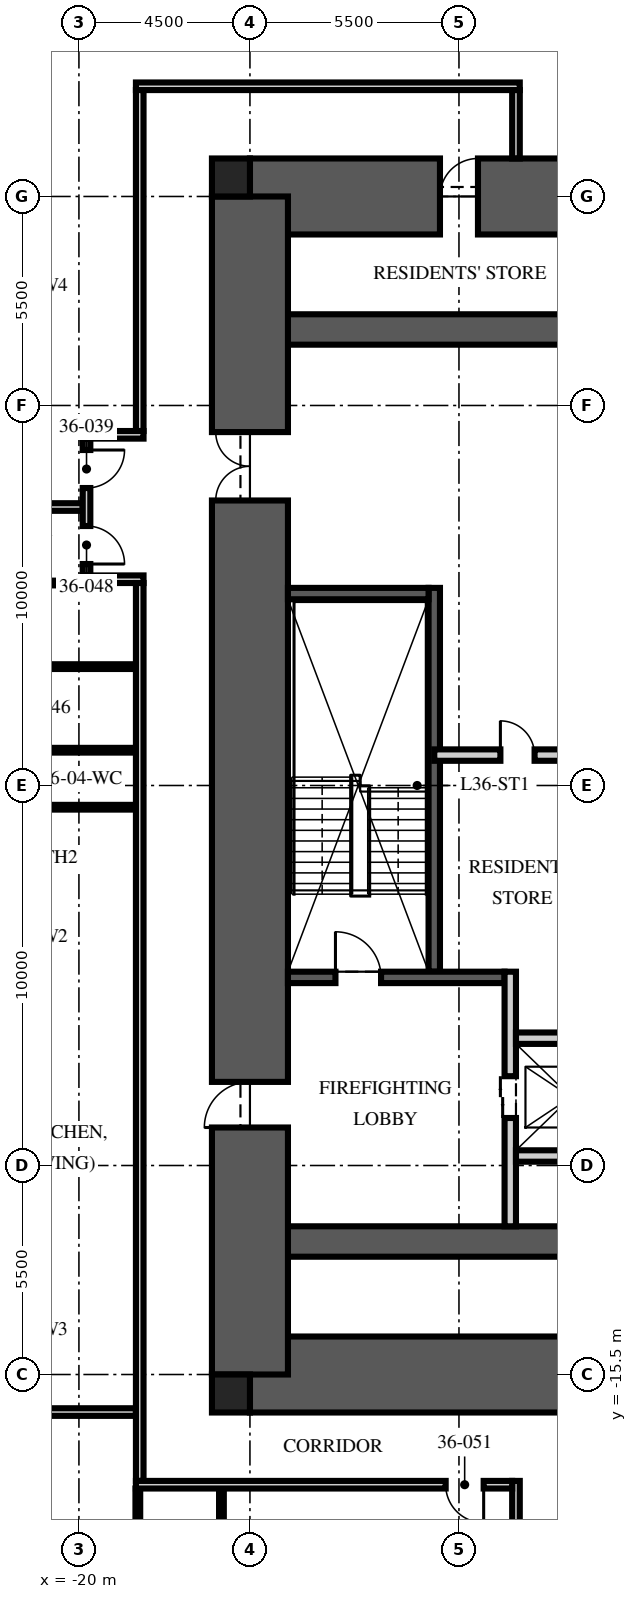
"""IFC4 building model, lengths in metres.
Left out: names, types, materials, properties, quantities, classifications, styles, units other than length and angle.
Written with IfcOpenShell. Run it as: python <this file> out.ifc"""

import sys

from ifc_helpers import new_model, si_unit, direction, frame, frame_2d, origin, origin_2d, place, context, subcontext, project, spatial, rectangle, extrude, element, fill, save


model = new_model("IFC4")
c1 = context("Model", 3, precision=1e-05, world=origin(), true_north=direction((0.0, 1.0)))
c2 = subcontext(c1, "Body", "Model", "MODEL_VIEW")
j1 = project(units=[si_unit("LENGTHUNIT", "METRE"), si_unit("PLANEANGLEUNIT", "RADIAN")], contexts=[c1])
p1 = place(None, origin())
s1 = spatial("IfcSite", under=j1, at=p1, CompositionType="ELEMENT")
p2 = place(p1, origin())
s2 = spatial("IfcBuilding", under=s1, at=p2, CompositionType="ELEMENT")
p3 = place(p2, frame((0.0, 0.0, 144.75)))
s3 = spatial("IfcBuildingStorey", under=s2, at=p3, CompositionType="ELEMENT", Elevation=144.75)
p4 = place(p3, frame((-15.5, 15.5, -0.25), z_axis=(0.0, 0.0, 1.0), x_axis=(1.0, 0.0, 0.0)))
e1 = element("IfcWall", 1, at=p4, inside=s3, PredefinedType="SHEAR", context=c2, shape_type="SweptSolid", body=[
    extrude(rectangle(XDim=31.0, YDim=2.0, at=frame_2d((15.5, 0.0))), origin(), (0.0, 0.0, 1.0), 3.75),
])
p5 = place(p4, frame((5.0, 0.0, 0.25)))
e2 = element("IfcOpeningElement", 2, at=p5, cuts=e1, PredefinedType="OPENING", context=c2, shape_type="SweptSolid", body=[
    extrude(rectangle(XDim=1.0, YDim=2.1, at=frame_2d((0.5, 1.05))), frame((0.0, 1.01, 0.0), z_axis=(0.0, -1.0, 0.0), x_axis=(1.0, 0.0, 0.0)), (0.0, 0.0, 1.0), 2.02),
])
p6 = place(p3, frame((-15.5, -15.5, -0.25), z_axis=(0.0, 0.0, 1.0), x_axis=(1.0, 0.0, 0.0)))
e3 = element("IfcWall", 3, at=p6, inside=s3, PredefinedType="SHEAR", context=c2, shape_type="SweptSolid", body=[
    extrude(rectangle(XDim=31.0, YDim=2.0, at=frame_2d((15.5, 0.0))), origin(), (0.0, 0.0, 1.0), 3.75),
])
p7 = place(p6, frame((10.4, 0.0, 0.25)))
e4 = element("IfcOpeningElement", 4, at=p7, cuts=e3, PredefinedType="OPENING", context=c2, shape_type="SweptSolid", body=[
    extrude(rectangle(XDim=1.1, YDim=2.1, at=frame_2d((0.55, 1.05))), frame((0.0, 1.01, 0.0), z_axis=(0.0, -1.0, 0.0), x_axis=(1.0, 0.0, 0.0)), (0.0, 0.0, 1.0), 2.02),
])
p8 = place(p6, frame((13.5, 0.0, 0.25)))
e5 = element("IfcOpeningElement", 5, at=p8, cuts=e3, PredefinedType="OPENING", context=c2, shape_type="SweptSolid", body=[
    extrude(rectangle(XDim=1.1, YDim=2.1, at=frame_2d((0.55, 1.05))), frame((0.0, 1.01, 0.0), z_axis=(0.0, -1.0, 0.0), x_axis=(1.0, 0.0, 0.0)), (0.0, 0.0, 1.0), 2.02),
])
p9 = place(p6, frame((16.6, 0.0, 0.25)))
e6 = element("IfcOpeningElement", 6, at=p9, cuts=e3, PredefinedType="OPENING", context=c2, shape_type="SweptSolid", body=[
    extrude(rectangle(XDim=1.1, YDim=2.1, at=frame_2d((0.55, 1.05))), frame((0.0, 1.01, 0.0), z_axis=(0.0, -1.0, 0.0), x_axis=(1.0, 0.0, 0.0)), (0.0, 0.0, 1.0), 2.02),
])
for number, where, z_axis, x_axis in (
    (7, (-15.5, 12.0, -0.25), (0.0, 0.0, 1.0), (1.0, 0.0, 0.0)),
    (8, (-15.5, -12.0, -0.25), (0.0, 0.0, 1.0), (1.0, 0.0, 0.0)),
):
    element("IfcWall", number, at=place(p3, frame(where, z_axis=z_axis, x_axis=x_axis)), inside=s3, PredefinedType="SHEAR", context=c2, shape_type="SweptSolid", body=[
        extrude(rectangle(XDim=31.0, YDim=0.8, at=frame_2d((15.5, 0.0))), origin(), (0.0, 0.0, 1.0), 3.75),
    ])
p10 = place(p3, frame((-15.5, -15.5, -0.25), z_axis=(0.0, 0.0, 1.0), x_axis=(0.0, 1.0, 0.0)))
e9 = element("IfcWall", 9, at=p10, inside=s3, PredefinedType="SHEAR", context=c2, shape_type="SweptSolid", body=[
    extrude(rectangle(XDim=31.0, YDim=2.0, at=frame_2d((15.5, 0.0))), origin(), (0.0, 0.0, 1.0), 3.75),
])
p11 = place(p10, frame((6.5, 0.0, 0.25)))
e10 = element("IfcOpeningElement", 10, at=p11, cuts=e9, PredefinedType="OPENING", context=c2, shape_type="SweptSolid", body=[
    extrude(rectangle(XDim=1.2, YDim=2.1, at=frame_2d((0.6, 1.05))), frame((0.0, 1.01, 0.0), z_axis=(0.0, -1.0, 0.0), x_axis=(1.0, 0.0, 0.0)), (0.0, 0.0, 1.0), 2.02),
])
p12 = place(p10, frame((23.0, 0.0, 0.25)))
e11 = element("IfcOpeningElement", 11, at=p12, cuts=e9, PredefinedType="OPENING", context=c2, shape_type="SweptSolid", body=[
    extrude(rectangle(XDim=1.8, YDim=2.1, at=frame_2d((0.9, 1.05))), frame((0.0, 1.01, 0.0), z_axis=(0.0, -1.0, 0.0), x_axis=(1.0, 0.0, 0.0)), (0.0, 0.0, 1.0), 2.02),
])
for number, where, z_axis, x_axis in (
    (12, (-16.0, 16.0, -0.25), (0.0, 0.0, 1.0), (1.0, 0.0, 0.0)),
    (13, (-16.0, -16.0, -0.25), (0.0, 0.0, 1.0), (1.0, 0.0, 0.0)),
):
    element("IfcColumn", number, at=place(p3, frame(where, z_axis=z_axis, x_axis=x_axis)), inside=s3, PredefinedType="COLUMN", context=c2, shape_type="SweptSolid", body=[
        extrude(rectangle(XDim=1.0, YDim=1.0, at=origin_2d()), origin(), (0.0, 0.0, 1.0), 3.75),
    ])
p13 = place(p3, frame((-10.65, -4.9, 0.0), z_axis=(0.0, 0.0, 1.0), x_axis=(0.0, 1.0, 0.0)))
e14 = element("IfcWall", 14, at=p13, inside=s3, PredefinedType="SOLIDWALL", context=c2, shape_type="SweptSolid", body=[
    extrude(rectangle(XDim=10.1, YDim=0.3, at=frame_2d((5.05, 0.0))), origin(), (0.0, 0.0, 1.0), 3.5),
])
p14 = place(p3, frame((-14.5, -5.05, 0.0), z_axis=(0.0, 0.0, 1.0), x_axis=(1.0, 0.0, 0.0)))
e15 = element("IfcWall", 15, at=p14, inside=s3, PredefinedType="SOLIDWALL", context=c2, shape_type="SweptSolid", body=[
    extrude(rectangle(XDim=5.7, YDim=0.3, at=frame_2d((2.85, 0.0))), origin(), (0.0, 0.0, 1.0), 3.5),
])
p15 = place(p14, frame((1.25, 0.0, 0.0)))
e16 = element("IfcOpeningElement", 16, at=p15, cuts=e15, PredefinedType="OPENING", context=c2, shape_type="SweptSolid", body=[
    extrude(rectangle(XDim=1.2, YDim=2.1, at=frame_2d((0.6, 1.05))), frame((0.0, 0.16, 0.0), z_axis=(0.0, -1.0, 0.0), x_axis=(1.0, 0.0, 0.0)), (0.0, 0.0, 1.0), 0.32),
])
p16 = place(p3, frame((-14.5, 5.05, 0.0), z_axis=(0.0, 0.0, 1.0), x_axis=(1.0, 0.0, 0.0)))
e17 = element("IfcWall", 17, at=p16, inside=s3, PredefinedType="SOLIDWALL", context=c2, shape_type="SweptSolid", body=[
    extrude(rectangle(XDim=3.7, YDim=0.3, at=frame_2d((1.85, 0.0))), origin(), (0.0, 0.0, 1.0), 3.5),
])
p17 = place(p3, frame((-8.65, -11.6, 0.0), z_axis=(0.0, 0.0, 1.0), x_axis=(0.0, 1.0, 0.0)))
e18 = element("IfcWall", 18, at=p17, inside=s3, PredefinedType="PARTITIONING", context=c2, shape_type="SweptSolid", body=[
    extrude(rectangle(XDim=6.7, YDim=0.3, at=frame_2d((3.35, 0.0))), origin(), (0.0, 0.0, 1.0), 3.5),
])
p18 = place(p17, frame((2.85, 0.0, 0.0)))
e19 = element("IfcOpeningElement", 19, at=p18, cuts=e18, PredefinedType="OPENING", context=c2, shape_type="SweptSolid", body=[
    extrude(rectangle(XDim=1.1, YDim=2.1, at=frame_2d((0.55, 1.05))), frame((0.0, 0.16, 0.0), z_axis=(0.0, -1.0, 0.0), x_axis=(1.0, 0.0, 0.0)), (0.0, 0.0, 1.0), 0.32),
])
p19 = place(p3, frame((-8.5, -6.65, 0.0), z_axis=(0.0, 0.0, 1.0), x_axis=(1.0, 0.0, 0.0)))
e20 = element("IfcWall", 20, at=p19, inside=s3, PredefinedType="PARTITIONING", context=c2, shape_type="SweptSolid", body=[
    extrude(rectangle(XDim=17.0, YDim=0.3, at=frame_2d((8.5, 0.0))), origin(), (0.0, 0.0, 1.0), 3.5),
])
p20 = place(p19, frame((7.8, 0.0, 0.0)))
e21 = element("IfcOpeningElement", 21, at=p20, cuts=e20, PredefinedType="OPENING", context=c2, shape_type="SweptSolid", body=[
    extrude(rectangle(XDim=1.3, YDim=2.4, at=frame_2d((0.65, 1.2))), frame((0.0, 0.16, 0.0), z_axis=(0.0, -1.0, 0.0), x_axis=(1.0, 0.0, 0.0)), (0.0, 0.0, 1.0), 0.32),
])
p21 = place(p19, frame((5.65, 0.0, 0.0)))
e22 = element("IfcOpeningElement", 22, at=p21, cuts=e20, PredefinedType="OPENING", context=c2, shape_type="SweptSolid", body=[
    extrude(rectangle(XDim=0.9, YDim=2.1, at=frame_2d((0.45, 1.05))), frame((0.0, 0.16, 0.0), z_axis=(0.0, -1.0, 0.0), x_axis=(1.0, 0.0, 0.0)), (0.0, 0.0, 1.0), 0.32),
])
p22 = place(p19, frame((10.4, 0.0, 0.0)))
e23 = element("IfcOpeningElement", 23, at=p22, cuts=e20, PredefinedType="OPENING", context=c2, shape_type="SweptSolid", body=[
    extrude(rectangle(XDim=0.9, YDim=2.1, at=frame_2d((0.45, 1.05))), frame((0.0, 0.16, 0.0), z_axis=(0.0, -1.0, 0.0), x_axis=(1.0, 0.0, 0.0)), (0.0, 0.0, 1.0), 0.32),
])
p23 = place(p3, frame((-8.5, -9.75, 0.0), z_axis=(0.0, 0.0, 1.0), x_axis=(1.0, 0.0, 0.0)))
e24 = element("IfcWall", 24, at=p23, inside=s3, PredefinedType="PARTITIONING", context=c2, shape_type="SweptSolid", body=[
    extrude(rectangle(XDim=2.9, YDim=0.3, at=frame_2d((1.45, 0.0))), origin(), (0.0, 0.0, 1.0), 3.5),
])
p24 = place(p3, frame((-10.65, 0.8, 0.0), z_axis=(0.0, 0.0, 1.0), x_axis=(1.0, 0.0, 0.0)))
e25 = element("IfcWall", 25, at=p24, inside=s3, PredefinedType="PARTITIONING", context=c2, shape_type="SweptSolid", body=[
    extrude(rectangle(XDim=21.3, YDim=0.3, at=frame_2d((10.65, 0.0))), origin(), (0.0, 0.0, 1.0), 3.5),
])
p25 = place(p24, frame((10.05, 0.0, 0.0)))
e26 = element("IfcOpeningElement", 26, at=p25, cuts=e25, PredefinedType="OPENING", context=c2, shape_type="SweptSolid", body=[
    extrude(rectangle(XDim=1.2, YDim=2.1, at=frame_2d((0.6, 1.05))), frame((0.0, 0.16, 0.0), z_axis=(0.0, -1.0, 0.0), x_axis=(1.0, 0.0, 0.0)), (0.0, 0.0, 1.0), 0.32),
])
p26 = place(p24, frame((1.74, 0.0, 0.0)))
e27 = element("IfcOpeningElement", 27, at=p26, cuts=e25, PredefinedType="OPENING", context=c2, shape_type="SweptSolid", body=[
    extrude(rectangle(XDim=0.9, YDim=2.1, at=frame_2d((0.45, 1.05))), frame((0.0, 0.16, 0.0), z_axis=(0.0, -1.0, 0.0), x_axis=(1.0, 0.0, 0.0)), (0.0, 0.0, 1.0), 0.32),
])
p27 = place(p3, frame((-18.5, 18.4, 0.0), z_axis=(0.0, 0.0, 1.0), x_axis=(1.0, 0.0, 0.0)))
e28 = element("IfcWall", 28, at=p27, inside=s3, PredefinedType="PARTITIONING", context=c2, shape_type="SweptSolid", body=[
    extrude(rectangle(XDim=10.1, YDim=0.2, at=frame_2d((5.05, 0.0))), origin(), (0.0, 0.0, 1.0), 2.3),
])
p28 = place(p3, frame((-8.5, 18.3, 0.0), z_axis=(0.0, 0.0, 1.0), x_axis=(0.0, -1.0, 0.0)))
e29 = element("IfcWall", 29, at=p28, inside=s3, PredefinedType="PARTITIONING", context=c2, shape_type="SweptSolid", body=[
    extrude(rectangle(XDim=1.8, YDim=0.2, at=frame_2d((0.9, 0.0))), origin(), (0.0, 0.0, 1.0), 3.5),
])
p29 = place(p3, frame((-19.9, 7.328, 0.0), z_axis=(0.0, 0.0, 1.0), x_axis=(-1.0, 0.0, 0.0)))
e30 = element("IfcWall", 30, at=p29, inside=s3, PredefinedType="PARTITIONING", context=c2, shape_type="SweptSolid", body=[
    extrude(rectangle(XDim=8.75, YDim=0.2, at=frame_2d((4.375, 0.0))), origin(), (0.0, 0.0, 1.0), 2.81),
])
p30 = place(p3, frame((-18.5, -16.488, 0.0), z_axis=(0.0, 0.0, 1.0), x_axis=(-1.0, 0.0, 0.0)))
e31 = element("IfcWall", 31, at=p30, inside=s3, PredefinedType="PARTITIONING", context=c2, shape_type="SweptSolid", body=[
    extrude(rectangle(XDim=10.15, YDim=0.2, at=frame_2d((5.075, 0.0))), origin(), (0.0, 0.0, 1.0), 2.81),
])
p31 = place(p3, frame((-19.97, 5.328, 0.0), z_axis=(0.0, 0.0, 1.0), x_axis=(-1.0, 0.0, 0.0)))
e32 = element("IfcWall", 32, at=p31, inside=s3, PredefinedType="PARTITIONING", context=c2, shape_type="SweptSolid", body=[
    extrude(rectangle(XDim=2.56, YDim=0.125, at=frame_2d((1.28, 0.0))), origin(), (0.0, 0.0, 1.0), 3.5),
])
for number, where, z_axis, x_axis in (
    (33, (-18.5, 3.128, 0.0), (0.0, 0.0, 1.0), (-1.0, 0.0, 0.0)),
    (34, (-18.5, 0.928, 0.0), (0.0, 0.0, 1.0), (-1.0, 0.0, 0.0)),
    (35, (-18.5, -0.572, 0.0), (0.0, 0.0, 1.0), (-1.0, 0.0, 0.0)),
):
    element("IfcWall", number, at=place(p3, frame(where, z_axis=z_axis, x_axis=x_axis)), inside=s3, PredefinedType="PARTITIONING", context=c2, shape_type="SweptSolid", body=[
        extrude(rectangle(XDim=4.03, YDim=0.125, at=frame_2d((2.015, 0.0))), origin(), (0.0, 0.0, 1.0), 3.5),
    ])
p32 = place(p3, frame((-18.45, -18.5, 0.0), z_axis=(0.0, 0.0, 1.0), x_axis=(0.0, -1.0, 0.0)))
e36 = element("IfcWall", 36, at=p32, inside=s3, PredefinedType="PARTITIONING", context=c2, shape_type="SweptSolid", body=[
    extrude(rectangle(XDim=4.03, YDim=0.125, at=frame_2d((2.015, 0.0))), origin(), (0.0, 0.0, 1.0), 2.3),
])
p33 = place(p3, frame((-16.25, -18.5, 0.0), z_axis=(0.0, 0.0, 1.0), x_axis=(0.0, -1.0, 0.0)))
e37 = element("IfcWall", 37, at=p33, inside=s3, PredefinedType="PARTITIONING", context=c2, shape_type="SweptSolid", body=[
    extrude(rectangle(XDim=4.03, YDim=0.125, at=frame_2d((2.015, 0.0))), origin(), (0.0, 0.0, 1.0), 3.5),
])
p34 = place(p3, frame((-18.4, 18.3, 0.0), z_axis=(0.0, 0.0, 1.0), x_axis=(0.0, -1.0, 0.0)))
e38 = element("IfcWall", 38, at=p34, inside=s3, PredefinedType="PARTITIONING", context=c2, shape_type="SweptSolid", body=[
    extrude(rectangle(XDim=8.972, YDim=0.2, at=frame_2d((4.486, 0.0))), origin(), (0.0, 0.0, 1.0), 2.3),
])
p35 = place(p3, frame((-18.3, 9.228, 0.0), z_axis=(0.0, 0.0, 1.0), x_axis=(-1.0, 0.0, 0.0)))
e39 = element("IfcWall", 39, at=p35, inside=s3, PredefinedType="PARTITIONING", context=c2, shape_type="SweptSolid", body=[
    extrude(rectangle(XDim=1.6, YDim=0.2, at=frame_2d((0.8, 0.0))), origin(), (0.0, 0.0, 1.0), 2.7),
])
p36 = place(p3, frame((-18.3, 5.428, 0.0), z_axis=(0.0, 0.0, 1.0), x_axis=(-1.0, 0.0, 0.0)))
e40 = element("IfcWall", 40, at=p36, inside=s3, PredefinedType="PARTITIONING", context=c2, shape_type="SweptSolid", body=[
    extrude(rectangle(XDim=1.6, YDim=0.2, at=frame_2d((0.8, 0.0))), origin(), (0.0, 0.0, 1.0), 3.5),
])
p37 = place(p3, frame((-19.8, 9.128, 0.0), z_axis=(0.0, 0.0, 1.0), x_axis=(0.0, -1.0, 0.0)))
e41 = element("IfcWall", 41, at=p37, inside=s3, PredefinedType="PARTITIONING", context=c2, shape_type="SweptSolid", body=[
    extrude(rectangle(XDim=3.6, YDim=0.2, at=frame_2d((1.8, 0.0))), origin(), (0.0, 0.0, 1.0), 2.7),
])
p38 = place(p37, frame((0.3, 0.0, 0.0)))
e42 = element("IfcOpeningElement", 42, at=p38, cuts=e41, PredefinedType="OPENING", context=c2, shape_type="SweptSolid", body=[
    extrude(rectangle(XDim=1.0, YDim=2.2, at=frame_2d((0.5, 1.1))), frame((0.0, 0.11, 0.0), z_axis=(0.0, -1.0, 0.0), x_axis=(1.0, 0.0, 0.0)), (0.0, 0.0, 1.0), 0.22),
])
p39 = place(p37, frame((2.3, 0.0, 0.0)))
e43 = element("IfcOpeningElement", 43, at=p39, cuts=e41, PredefinedType="OPENING", context=c2, shape_type="SweptSolid", body=[
    extrude(rectangle(XDim=1.0, YDim=2.2, at=frame_2d((0.5, 1.1))), frame((0.0, 0.11, 0.0), z_axis=(0.0, -1.0, 0.0), x_axis=(1.0, 0.0, 0.0)), (0.0, 0.0, 1.0), 0.22),
])
p40 = place(p3, frame((-18.4, 5.328, 0.0), z_axis=(0.0, 0.0, 1.0), x_axis=(0.0, -1.0, 0.0)))
e44 = element("IfcWall", 44, at=p40, inside=s3, PredefinedType="PARTITIONING", context=c2, shape_type="SweptSolid", body=[
    extrude(rectangle(XDim=23.628, YDim=0.2, at=frame_2d((11.814, 0.0))), origin(), (0.0, 0.0, 1.0), 2.3),
])
p41 = place(p3, frame((-8.5, -18.3, 0.0), z_axis=(0.0, 0.0, 1.0), x_axis=(0.0, -1.0, 0.0)))
e45 = element("IfcWall", 45, at=p41, inside=s3, PredefinedType="PARTITIONING", context=c2, shape_type="SweptSolid", body=[
    extrude(rectangle(XDim=3.0, YDim=0.2, at=frame_2d((1.5, 0.0))), origin(), (0.0, 0.0, 1.0), 3.5),
])
p42 = place(p3, frame((-8.6, -18.4, 0.0), z_axis=(0.0, 0.0, 1.0), x_axis=(-1.0, 0.0, 0.0)))
e46 = element("IfcWall", 46, at=p42, inside=s3, PredefinedType="PARTITIONING", context=c2, shape_type="SweptSolid", body=[
    extrude(rectangle(XDim=9.9, YDim=0.2, at=frame_2d((4.95, 0.0))), origin(), (0.0, 0.0, 1.0), 2.3),
])
p43 = place(p42, frame((0.75, 0.0, 0.0)))
e47 = element("IfcOpeningElement", 47, at=p43, cuts=e46, PredefinedType="OPENING", context=c2, shape_type="SweptSolid", body=[
    extrude(rectangle(XDim=1.0, YDim=2.2, at=frame_2d((0.5, 1.1))), frame((0.0, 0.11, 0.0), z_axis=(0.0, -1.0, 0.0), x_axis=(1.0, 0.0, 0.0)), (0.0, 0.0, 1.0), 0.22),
])
p44 = place(p15, origin())
e48 = element("IfcDoor", 48, at=p44, inside=s3, OperationType="SINGLE_SWING_LEFT", PredefinedType="DOOR", context=c2, shape_type="SweptSolid", body=[
    extrude(rectangle(XDim=1.2, YDim=2.1, at=frame_2d((0.6, 1.05))), frame((0.0, 0.025, 0.0), z_axis=(0.0, -1.0, 0.0), x_axis=(1.0, 0.0, 0.0)), (0.0, 0.0, 1.0), 0.05),
])
fill(e16, e48)
p45 = place(p11, origin())
e49 = element("IfcDoor", 49, at=p45, inside=s3, OperationType="SINGLE_SWING_LEFT", PredefinedType="DOOR", context=c2, shape_type="SweptSolid", body=[
    extrude(rectangle(XDim=1.2, YDim=2.1, at=frame_2d((0.6, 1.05))), frame((0.0, 0.025, 0.0), z_axis=(0.0, -1.0, 0.0), x_axis=(1.0, 0.0, 0.0)), (0.0, 0.0, 1.0), 0.05),
])
fill(e10, e49)
p46 = place(p12, origin())
e50 = element("IfcDoor", 50, at=p46, inside=s3, OperationType="DOUBLE_DOOR_SINGLE_SWING", PredefinedType="DOOR", context=c2, shape_type="SweptSolid", body=[
    extrude(rectangle(XDim=1.8, YDim=2.1, at=frame_2d((0.9, 1.05))), frame((0.0, 0.025, 0.0), z_axis=(0.0, -1.0, 0.0), x_axis=(1.0, 0.0, 0.0)), (0.0, 0.0, 1.0), 0.05),
])
fill(e11, e50)
p47 = place(p18, origin())
e51 = element("IfcDoor", 51, at=p47, inside=s3, OperationType="DOUBLE_DOOR_SLIDING", PredefinedType="DOOR", context=c2, shape_type="SweptSolid", body=[
    extrude(rectangle(XDim=1.1, YDim=2.1, at=frame_2d((0.55, 1.05))), frame((0.0, 0.025, 0.0), z_axis=(0.0, -1.0, 0.0), x_axis=(1.0, 0.0, 0.0)), (0.0, 0.0, 1.0), 0.05),
])
fill(e19, e51)
p48 = place(p26, origin())
e52 = element("IfcDoor", 52, at=p48, inside=s3, OperationType="SINGLE_SWING_LEFT", PredefinedType="DOOR", context=c2, shape_type="SweptSolid", body=[
    extrude(rectangle(XDim=0.9, YDim=2.1, at=frame_2d((0.45, 1.05))), frame((0.0, 0.025, 0.0), z_axis=(0.0, -1.0, 0.0), x_axis=(1.0, 0.0, 0.0)), (0.0, 0.0, 1.0), 0.05),
])
fill(e27, e52)
p49 = place(p5, origin())
e53 = element("IfcDoor", 53, at=p49, inside=s3, OperationType="SINGLE_SWING_RIGHT", PredefinedType="DOOR", context=c2, shape_type="SweptSolid", body=[
    extrude(rectangle(XDim=1.0, YDim=2.1, at=frame_2d((0.5, 1.05))), frame((0.0, 0.025, 0.0), z_axis=(0.0, -1.0, 0.0), x_axis=(1.0, 0.0, 0.0)), (0.0, 0.0, 1.0), 0.05),
])
fill(e2, e53)
p50 = place(p38, origin())
e54 = element("IfcDoor", 54, at=p50, inside=s3, OperationType="SINGLE_SWING_LEFT", PredefinedType="DOOR", context=c2, shape_type="SweptSolid", body=[
    extrude(rectangle(XDim=1.0, YDim=2.2, at=frame_2d((0.5, 1.1))), frame((0.0, 0.025, 0.0), z_axis=(0.0, -1.0, 0.0), x_axis=(1.0, 0.0, 0.0)), (0.0, 0.0, 1.0), 0.05),
])
fill(e42, e54)
p51 = place(p39, origin())
e55 = element("IfcDoor", 55, at=p51, inside=s3, OperationType="SINGLE_SWING_RIGHT", PredefinedType="DOOR", context=c2, shape_type="SweptSolid", body=[
    extrude(rectangle(XDim=1.0, YDim=2.2, at=frame_2d((0.5, 1.1))), frame((0.0, 0.025, 0.0), z_axis=(0.0, -1.0, 0.0), x_axis=(1.0, 0.0, 0.0)), (0.0, 0.0, 1.0), 0.05),
])
fill(e43, e55)
p52 = place(p43, origin())
e56 = element("IfcDoor", 56, at=p52, inside=s3, OperationType="SINGLE_SWING_LEFT", PredefinedType="DOOR", context=c2, shape_type="SweptSolid", body=[
    extrude(rectangle(XDim=1.0, YDim=2.2, at=frame_2d((0.5, 1.1))), frame((0.0, 0.025, 0.0), z_axis=(0.0, -1.0, 0.0), x_axis=(1.0, 0.0, 0.0)), (0.0, 0.0, 1.0), 0.05),
])
fill(e47, e56)
save(model, sys.argv[1])
